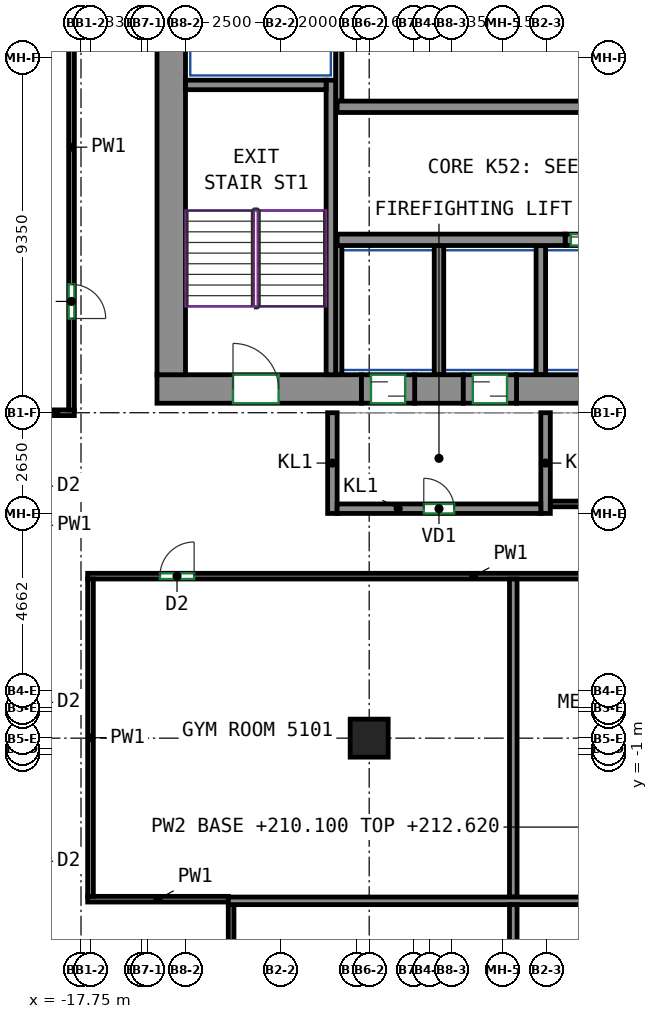
"""IFC4 building model, lengths in metres.
Left out: names, types, materials, properties, quantities, classifications, styles, units other than length and angle.
Written with IfcOpenShell. Run it as: python <this file> out.ifc"""

import sys

from ifc_helpers import new_model, si_unit, direction, frame, frame_2d, origin, origin_2d, place, context, subcontext, project, spatial, rectangle, extrude, source, transform, mapped, element, fill, save


model = new_model("IFC4")
c1 = context("Model", 3, precision=1e-05, world=origin(), true_north=direction((0.0, 1.0)))
c2 = subcontext(c1, "Body", "Model", "MODEL_VIEW")
j1 = project(units=[si_unit("LENGTHUNIT", "METRE"), si_unit("PLANEANGLEUNIT", "RADIAN")], contexts=[c1])
p1 = place(None, origin())
s1 = spatial("IfcSite", under=j1, at=p1, CompositionType="ELEMENT")
p2 = place(p1, origin())
s2 = spatial("IfcBuilding", under=s1, at=p2, CompositionType="ELEMENT")
p3 = place(p2, frame((0.0, 0.0, 210.1)))
s3 = spatial("IfcBuildingStorey", under=s2, at=p3, CompositionType="ELEMENT", Elevation=210.1)
m1 = source(origin(), c2, "Body", "SweptSolid", [
    extrude(rectangle(XDim=1.0, YDim=1.0, at=origin_2d()), origin(), (0.0, 0.0, 1.0), 3.12),
])
p4 = place(p3, frame((-10.167, -0.562, 0.0), z_axis=(0.0, 0.0, 1.0), x_axis=(1.0, 0.0, 0.0)))
e1 = element("IfcColumn", 1, at=p4, inside=s3, PredefinedType="COLUMN", context=c2, shape_type="MappedRepresentation", body=[
    mapped(m1, transform((0.0, 0.0, 0.0))),
])
m2 = source(origin(), c2, "Body", "SweptSolid", [
    extrude(rectangle(XDim=5.38, YDim=0.75, at=frame_2d((2.69, 0.0))), origin(), (0.0, 0.0, 1.0), 3.12),
])
p5 = place(p3, frame((-15.75, 8.625, 0.0), z_axis=(0.0, 0.0, 1.0), x_axis=(1.0, 0.0, 0.0)))
e2 = element("IfcWall", 2, at=p5, inside=s3, PredefinedType="SHEAR", context=c2, shape_type="MappedRepresentation", body=[
    mapped(m2, transform((0.0, 0.0, 0.0))),
])
p6 = place(p5, frame((2.0, 0.0, 0.0)))
e3 = element("IfcOpeningElement", 3, at=p6, cuts=e2, PredefinedType="OPENING", context=c2, shape_type="SweptSolid", body=[
    extrude(rectangle(XDim=1.2, YDim=2.1, at=frame_2d((0.6, 1.05))), frame((0.0, 0.385, 0.0), z_axis=(0.0, -1.0, 0.0), x_axis=(1.0, 0.0, 0.0)), (0.0, 0.0, 1.0), 0.77),
])
m3 = source(origin(), c2, "Body", "SweptSolid", [
    extrude(rectangle(XDim=1.28, YDim=0.75, at=frame_2d((0.64, 0.0))), origin(), (0.0, 0.0, 1.0), 3.12),
])
p7 = place(p3, frame((-8.97, 8.625, 0.0), z_axis=(0.0, 0.0, 1.0), x_axis=(1.0, 0.0, 0.0)))
e4 = element("IfcWall", 4, at=p7, inside=s3, PredefinedType="SHEAR", context=c2, shape_type="MappedRepresentation", body=[
    mapped(m3, transform((0.0, 0.0, 0.0))),
])
m4 = source(origin(), c2, "Body", "SweptSolid", [
    extrude(rectangle(XDim=14.18, YDim=0.75, at=frame_2d((7.09, 0.0))), origin(), (0.0, 0.0, 1.0), 3.12),
])
p8 = place(p3, frame((-6.29, 8.625, 0.0), z_axis=(0.0, 0.0, 1.0), x_axis=(1.0, 0.0, 0.0)))
e5 = element("IfcWall", 5, at=p8, inside=s3, PredefinedType="SHEAR", context=c2, shape_type="MappedRepresentation", body=[
    mapped(m4, transform((0.0, 0.0, 0.0))),
])
m5 = source(origin(), c2, "Body", "SweptSolid", [
    extrude(rectangle(XDim=12.0, YDim=0.75, at=frame_2d((6.0, 0.0))), origin(), (0.0, 0.0, 1.0), 3.12),
])
p9 = place(p3, frame((-15.375, 9.0, 0.0), z_axis=(0.0, 0.0, 1.0), x_axis=(0.0, 1.0, 0.0)))
e6 = element("IfcWall", 6, at=p9, inside=s3, PredefinedType="SHEAR", context=c2, shape_type="MappedRepresentation", body=[
    mapped(m5, transform((0.0, 0.0, 0.0))),
])
m6 = source(origin(), c2, "Body", "SweptSolid", [
    extrude(rectangle(XDim=7.75, YDim=0.25, at=frame_2d((3.875, 0.0))), origin(), (0.0, 0.0, 1.0), 3.12),
])
p10 = place(p3, frame((-11.175, 9.0, 0.0), z_axis=(0.0, 0.0, 1.0), x_axis=(0.0, 1.0, 0.0)))
e7 = element("IfcWall", 7, at=p10, inside=s3, PredefinedType="SHEAR", context=c2, shape_type="MappedRepresentation", body=[
    mapped(m6, transform((0.0, 0.0, 0.0))),
])
m7 = source(origin(), c2, "Body", "SweptSolid", [
    extrude(rectangle(XDim=3.7, YDim=0.25, at=frame_2d((1.85, 0.0))), origin(), (0.0, 0.0, 1.0), 3.12),
])
p11 = place(p3, frame((-15.0, 16.625, 0.0), z_axis=(0.0, 0.0, 1.0), x_axis=(1.0, 0.0, 0.0)))
e8 = element("IfcWall", 8, at=p11, inside=s3, PredefinedType="SHEAR", context=c2, shape_type="MappedRepresentation", body=[
    mapped(m7, transform((0.0, 0.0, 0.0))),
])
m8 = source(origin(), c2, "Body", "SweptSolid", [
    extrude(rectangle(XDim=6.0, YDim=0.3, at=frame_2d((3.0, 0.0))), origin(), (0.0, 0.0, 1.0), 3.12),
])
p12 = place(p3, frame((-11.01, 12.55, 0.0), z_axis=(0.0, 0.0, 1.0), x_axis=(1.0, 0.0, 0.0)))
e9 = element("IfcWall", 9, at=p12, inside=s3, PredefinedType="SHEAR", context=c2, shape_type="MappedRepresentation", body=[
    mapped(m8, transform((0.0, 0.0, 0.0))),
])
m9 = source(origin(), c2, "Body", "SweptSolid", [
    extrude(rectangle(XDim=14.04, YDim=0.3, at=frame_2d((7.02, 0.0))), origin(), (0.0, 0.0, 1.0), 3.12),
])
p13 = place(p3, frame((-11.01, 16.05, 0.0), z_axis=(0.0, 0.0, 1.0), x_axis=(1.0, 0.0, 0.0)))
e10 = element("IfcWall", 10, at=p13, inside=s3, PredefinedType="SHEAR", context=c2, shape_type="MappedRepresentation", body=[
    mapped(m9, transform((0.0, 0.0, 0.0))),
])
m10 = source(origin(), c2, "Body", "SweptSolid", [
    extrude(rectangle(XDim=1.4, YDim=0.3, at=frame_2d((0.7, 0.0))), origin(), (0.0, 0.0, 1.0), 3.12),
])
p14 = place(p3, frame((-5.01, 12.55, 0.0), z_axis=(0.0, 0.0, 1.0), x_axis=(1.0, 0.0, 0.0)))
e11 = element("IfcWall", 11, at=p14, inside=s3, PredefinedType="PARTITIONING", context=c2, shape_type="MappedRepresentation", body=[
    mapped(m10, transform((0.0, 0.0, 0.0))),
])
p15 = place(p14, frame((0.15, 0.0, 0.0)))
e12 = element("IfcOpeningElement", 12, at=p15, cuts=e11, PredefinedType="OPENING", context=c2, shape_type="SweptSolid", body=[
    extrude(rectangle(XDim=1.1, YDim=2.1, at=frame_2d((0.55, 1.05))), frame((0.0, 0.16, 0.0), z_axis=(0.0, -1.0, 0.0), x_axis=(1.0, 0.0, 0.0)), (0.0, 0.0, 1.0), 0.32),
])
m11 = source(origin(), c2, "Body", "SweptSolid", [
    extrude(rectangle(XDim=2.65, YDim=0.25, at=frame_2d((1.325, 0.0))), origin(), (0.0, 0.0, 1.0), 3.12),
])
for number, where, z_axis, x_axis in (
    (13, (-11.135, 5.35, 0.0), (0.0, 0.0, 1.0), (0.0, 1.0, 0.0)),
    (14, (-5.525, 5.35, 0.0), (0.0, 0.0, 1.0), (0.0, 1.0, 0.0)),
):
    element("IfcWall", number, at=place(p3, frame(where, z_axis=z_axis, x_axis=x_axis)), inside=s3, PredefinedType="PARTITIONING", context=c2, shape_type="MappedRepresentation", body=[
        mapped(m11, transform((0.0, 0.0, 0.0))),
    ])
m12 = source(origin(), c2, "Body", "SweptSolid", [
    extrude(rectangle(XDim=5.36, YDim=0.25, at=frame_2d((2.68, 0.0))), origin(), (0.0, 0.0, 1.0), 3.12),
])
p16 = place(p3, frame((-11.01, 5.475, 0.0), z_axis=(0.0, 0.0, 1.0), x_axis=(1.0, 0.0, 0.0)))
e15 = element("IfcWall", 15, at=p16, inside=s3, PredefinedType="PARTITIONING", context=c2, shape_type="MappedRepresentation", body=[
    mapped(m12, transform((0.0, 0.0, 0.0))),
])
p17 = place(p16, frame((2.28, 0.0, 0.0)))
e16 = element("IfcOpeningElement", 16, at=p17, cuts=e15, PredefinedType="OPENING", context=c2, shape_type="SweptSolid", body=[
    extrude(rectangle(XDim=0.8, YDim=2.0, at=frame_2d((0.4, 1.0))), frame((0.0, 0.135, 0.0), z_axis=(0.0, -1.0, 0.0), x_axis=(1.0, 0.0, 0.0)), (0.0, 0.0, 1.0), 0.27),
])
m13 = source(origin(), c2, "Body", "SweptSolid", [
    extrude(rectangle(XDim=4.8, YDim=0.165, at=frame_2d((2.4, 0.0))), origin(), (0.0, 0.0, 1.0), 3.12),
])
p18 = place(p3, frame((-10.968, 16.2, 0.0), z_axis=(0.0, 0.0, 1.0), x_axis=(0.0, 1.0, 0.0)))
e17 = element("IfcWall", 17, at=p18, inside=s3, PredefinedType="PARTITIONING", context=c2, shape_type="MappedRepresentation", body=[
    mapped(m13, transform((0.0, 0.0, 0.0))),
])
m14 = source(origin(), c2, "Body", "SweptSolid", [
    extrude(rectangle(XDim=3.4, YDim=0.165, at=frame_2d((1.7, 0.0))), origin(), (0.0, 0.0, 1.0), 3.12),
])
p19 = place(p3, frame((-10.968, 9.0, 0.0), z_axis=(0.0, 0.0, 1.0), x_axis=(0.0, 1.0, 0.0)))
e18 = element("IfcWall", 18, at=p19, inside=s3, PredefinedType="PARTITIONING", context=c2, shape_type="MappedRepresentation", body=[
    mapped(m14, transform((0.0, 0.0, 0.0))),
])
m15 = source(origin(), c2, "Body", "SweptSolid", [
    extrude(rectangle(XDim=3.4, YDim=0.25, at=frame_2d((1.7, 0.0))), origin(), (0.0, 0.0, 1.0), 3.12),
])
for number, where, z_axis, x_axis in (
    (19, (-5.65, 9.0, 0.0), (0.0, 0.0, 1.0), (0.0, 1.0, 0.0)),
    (20, (-8.33, 9.0, 0.0), (0.0, 0.0, 1.0), (0.0, 1.0, 0.0)),
):
    element("IfcWall", number, at=place(p3, frame(where, z_axis=z_axis, x_axis=x_axis)), inside=s3, PredefinedType="PARTITIONING", context=c2, shape_type="MappedRepresentation", body=[
        mapped(m15, transform((0.0, 0.0, 0.0))),
    ])
m16 = source(origin(), c2, "Body", "SweptSolid", [
    extrude(rectangle(XDim=1.4, YDim=0.75, at=frame_2d((0.7, 0.0))), origin(), (0.0, 0.0, 1.0), 2.7),
])
p20 = place(p3, frame((-10.37, 8.625, 0.0), z_axis=(0.0, 0.0, 1.0), x_axis=(1.0, 0.0, 0.0)))
e21 = element("IfcWall", 21, at=p20, inside=s3, PredefinedType="PARTITIONING", context=c2, shape_type="MappedRepresentation", body=[
    mapped(m16, transform((0.0, 0.0, 0.0))),
])
p21 = place(p20, frame((0.25, 0.0, 0.0)))
e22 = element("IfcOpeningElement", 22, at=p21, cuts=e21, PredefinedType="OPENING", context=c2, shape_type="SweptSolid", body=[
    extrude(rectangle(XDim=0.9, YDim=2.1, at=frame_2d((0.45, 1.05))), frame((0.0, 0.385, 0.0), z_axis=(0.0, -1.0, 0.0), x_axis=(1.0, 0.0, 0.0)), (0.0, 0.0, 1.0), 0.77),
])
m17 = source(origin(), c2, "Body", "SweptSolid", [
    extrude(rectangle(XDim=1.4, YDim=0.75, at=frame_2d((0.7, 0.0))), origin(), (0.0, 0.0, 1.0), 2.7),
])
p22 = place(p3, frame((-7.69, 8.625, 0.0), z_axis=(0.0, 0.0, 1.0), x_axis=(1.0, 0.0, 0.0)))
e23 = element("IfcWall", 23, at=p22, inside=s3, PredefinedType="PARTITIONING", context=c2, shape_type="MappedRepresentation", body=[
    mapped(m17, transform((0.0, 0.0, 0.0))),
])
p23 = place(p22, frame((0.25, 0.0, 0.0)))
e24 = element("IfcOpeningElement", 24, at=p23, cuts=e23, PredefinedType="OPENING", context=c2, shape_type="SweptSolid", body=[
    extrude(rectangle(XDim=0.9, YDim=2.1, at=frame_2d((0.45, 1.05))), frame((0.0, 0.385, 0.0), z_axis=(0.0, -1.0, 0.0), x_axis=(1.0, 0.0, 0.0)), (0.0, 0.0, 1.0), 0.77),
])
p24 = place(p3, frame((-17.925, 8.0, 0.0), z_axis=(0.0, 0.0, 1.0), x_axis=(-1.0, 0.0, 0.0)))
e25 = element("IfcWall", 25, at=p24, inside=s3, PredefinedType="PARTITIONING", context=c2, shape_type="SweptSolid", body=[
    extrude(rectangle(XDim=0.976, YDim=0.15, at=frame_2d((0.488, 0.0))), origin(), (0.0, 0.0, 1.0), 3.12),
])
p25 = place(p3, frame((-18.0, 21.9, 0.0), z_axis=(0.0, 0.0, 1.0), x_axis=(0.0, -1.0, 0.0)))
e26 = element("IfcWall", 26, at=p25, inside=s3, PredefinedType="PARTITIONING", context=c2, shape_type="SweptSolid", body=[
    extrude(rectangle(XDim=13.825, YDim=0.15, at=frame_2d((6.913, 0.0))), origin(), (0.0, 0.0, 1.0), 3.12),
])
p26 = place(p25, frame((10.521, 0.0, 0.0)))
e27 = element("IfcOpeningElement", 27, at=p26, cuts=e26, PredefinedType="OPENING", context=c2, shape_type="SweptSolid", body=[
    extrude(rectangle(XDim=0.9, YDim=2.1, at=frame_2d((0.45, 1.05))), frame((0.0, 0.085, 0.0), z_axis=(0.0, -1.0, 0.0), x_axis=(1.0, 0.0, 0.0)), (0.0, 0.0, 1.0), 0.17),
])
p27 = place(p3, frame((7.875, 5.6, 0.0), z_axis=(0.0, 0.0, 1.0), x_axis=(-1.0, 0.0, 0.0)))
e28 = element("IfcWall", 28, at=p27, inside=s3, PredefinedType="PARTITIONING", context=c2, shape_type="SweptSolid", body=[
    extrude(rectangle(XDim=13.275, YDim=0.15, at=frame_2d((6.637, 0.0))), origin(), (0.0, 0.0, 1.0), 3.12),
])
p28 = place(p27, frame((0.703, 0.0, 0.0)))
e29 = element("IfcOpeningElement", 29, at=p28, cuts=e28, PredefinedType="OPENING", context=c2, shape_type="SweptSolid", body=[
    extrude(rectangle(XDim=1.0, YDim=2.1, at=frame_2d((0.5, 1.05))), frame((0.0, 0.085, 0.0), z_axis=(0.0, -1.0, 0.0), x_axis=(1.0, 0.0, 0.0)), (0.0, 0.0, 1.0), 0.17),
])
p29 = place(p3, frame((-17.575, -4.8, 0.0), z_axis=(0.0, 0.0, 1.0), x_axis=(1.0, 0.0, 0.0)))
e30 = element("IfcWall", 30, at=p29, inside=s3, PredefinedType="PARTITIONING", context=c2, shape_type="SweptSolid", body=[
    extrude(rectangle(XDim=3.702, YDim=0.15, at=frame_2d((1.851, 0.0))), origin(), (0.0, 0.0, 1.0), 3.12),
])
p30 = place(p3, frame((-17.575, 3.7, 0.0), z_axis=(0.0, 0.0, 1.0), x_axis=(1.0, 0.0, 0.0)))
e31 = element("IfcWall", 31, at=p30, inside=s3, PredefinedType="PARTITIONING", context=c2, shape_type="SweptSolid", body=[
    extrude(rectangle(XDim=33.85, YDim=0.15, at=frame_2d((16.925, 0.0))), origin(), (0.0, 0.0, 1.0), 3.12),
])
p31 = place(p30, frame((1.902, 0.0, 0.0)))
e32 = element("IfcOpeningElement", 32, at=p31, cuts=e31, PredefinedType="OPENING", context=c2, shape_type="SweptSolid", body=[
    extrude(rectangle(XDim=0.9, YDim=2.1, at=frame_2d((0.45, 1.05))), frame((0.0, 0.085, 0.0), z_axis=(0.0, -1.0, 0.0), x_axis=(1.0, 0.0, 0.0)), (0.0, 0.0, 1.0), 0.17),
])
p32 = place(p30, frame((15.841, 0.0, 0.0)))
e33 = element("IfcOpeningElement", 33, at=p32, cuts=e31, PredefinedType="OPENING", context=c2, shape_type="SweptSolid", body=[
    extrude(rectangle(XDim=0.9, YDim=2.1, at=frame_2d((0.45, 1.05))), frame((0.0, 0.085, 0.0), z_axis=(0.0, -1.0, 0.0), x_axis=(1.0, 0.0, 0.0)), (0.0, 0.0, 1.0), 0.17),
])
p33 = place(p30, frame((20.724, 0.0, 0.0)))
e34 = element("IfcOpeningElement", 34, at=p33, cuts=e31, PredefinedType="OPENING", context=c2, shape_type="SweptSolid", body=[
    extrude(rectangle(XDim=0.9, YDim=2.1, at=frame_2d((0.45, 1.05))), frame((0.0, 0.085, 0.0), z_axis=(0.0, -1.0, 0.0), x_axis=(1.0, 0.0, 0.0)), (0.0, 0.0, 1.0), 0.17),
])
p34 = place(p30, frame((27.46, 0.0, 0.0)))
e35 = element("IfcOpeningElement", 35, at=p34, cuts=e31, PredefinedType="OPENING", context=c2, shape_type="SweptSolid", body=[
    extrude(rectangle(XDim=0.9, YDim=2.1, at=frame_2d((0.45, 1.05))), frame((0.0, 0.085, 0.0), z_axis=(0.0, -1.0, 0.0), x_axis=(1.0, 0.0, 0.0)), (0.0, 0.0, 1.0), 0.17),
])
p35 = place(p3, frame((-17.5, -4.725, 0.0), z_axis=(0.0, 0.0, 1.0), x_axis=(0.0, 1.0, 0.0)))
e36 = element("IfcWall", 36, at=p35, inside=s3, PredefinedType="PARTITIONING", context=c2, shape_type="SweptSolid", body=[
    extrude(rectangle(XDim=8.35, YDim=0.15, at=frame_2d((4.175, 0.0))), origin(), (0.0, 0.0, 1.0), 3.12),
])
p36 = place(p3, frame((-13.8, -7.75, 0.0), z_axis=(0.0, 0.0, 1.0), x_axis=(0.0, 1.0, 0.0)))
e37 = element("IfcWall", 37, at=p36, inside=s3, PredefinedType="PARTITIONING", context=c2, shape_type="SweptSolid", body=[
    extrude(rectangle(XDim=2.817, YDim=0.15, at=frame_2d((1.408, 0.0))), origin(), (0.0, 0.0, 1.0), 3.12),
])
p37 = place(p3, frame((-6.375, -4.743, 0.0), z_axis=(0.0, 0.0, 1.0), x_axis=(0.0, 1.0, 0.0)))
e38 = element("IfcWall", 38, at=p37, inside=s3, PredefinedType="PARTITIONING", context=c2, shape_type="SweptSolid", body=[
    extrude(rectangle(XDim=8.366, YDim=0.2, at=frame_2d((4.183, 0.0))), origin(), (0.0, 0.0, 1.0), 3.12),
])
p38 = place(p3, frame((-13.873, -4.843, 0.0), z_axis=(0.0, 0.0, 1.0), x_axis=(1.0, 0.0, 0.0)))
e39 = element("IfcWall", 39, at=p38, inside=s3, PredefinedType="PARTITIONING", context=c2, shape_type="SweptSolid", body=[
    extrude(rectangle(XDim=30.146, YDim=0.2, at=frame_2d((15.073, 0.0))), origin(), (0.0, 0.0, 1.0), 3.12),
])
p39 = place(p3, frame((-6.375, -15.423, 0.0), z_axis=(0.0, 0.0, 1.0), x_axis=(0.0, 1.0, 0.0)))
e40 = element("IfcWall", 40, at=p39, inside=s3, PredefinedType="PARTITIONING", context=c2, shape_type="SweptSolid", body=[
    extrude(rectangle(XDim=10.48, YDim=0.2, at=frame_2d((5.24, 0.0))), origin(), (0.0, 0.0, 1.0), 3.12),
])
p40 = place(p17, origin())
e41 = element("IfcDoor", 41, at=p40, inside=s3, OperationType="SINGLE_SWING_LEFT", PredefinedType="DOOR", context=c2, shape_type="SweptSolid", body=[
    extrude(rectangle(XDim=0.8, YDim=2.0, at=frame_2d((0.4, 1.0))), frame((0.0, 0.025, 0.0), z_axis=(0.0, -1.0, 0.0), x_axis=(1.0, 0.0, 0.0)), (0.0, 0.0, 1.0), 0.05),
])
fill(e16, e41)
p41 = place(p21, origin())
e42 = element("IfcDoor", 42, at=p41, inside=s3, OperationType="SLIDING_TO_LEFT", PredefinedType="DOOR", context=c2, shape_type="SweptSolid", body=[
    extrude(rectangle(XDim=0.9, YDim=2.1, at=frame_2d((0.45, 1.05))), frame((0.0, 0.28, 0.0), z_axis=(0.0, -1.0, 0.0), x_axis=(1.0, 0.0, 0.0)), (0.0, 0.0, 1.0), 0.05),
])
fill(e22, e42)
p42 = place(p23, origin())
e43 = element("IfcDoor", 43, at=p42, inside=s3, OperationType="SLIDING_TO_RIGHT", PredefinedType="DOOR", context=c2, shape_type="SweptSolid", body=[
    extrude(rectangle(XDim=0.9, YDim=2.1, at=frame_2d((0.45, 1.05))), frame((0.0, 0.28, 0.0), z_axis=(0.0, -1.0, 0.0), x_axis=(1.0, 0.0, 0.0)), (0.0, 0.0, 1.0), 0.05),
])
fill(e24, e43)
p43 = place(p15, origin())
e44 = element("IfcDoor", 44, at=p43, inside=s3, OperationType="DOUBLE_DOOR_SLIDING", PredefinedType="DOOR", context=c2, shape_type="SweptSolid", body=[
    extrude(rectangle(XDim=1.1, YDim=2.1, at=frame_2d((0.55, 1.05))), frame((0.0, 0.025, 0.0), z_axis=(0.0, -1.0, 0.0), x_axis=(1.0, 0.0, 0.0)), (0.0, 0.0, 1.0), 0.05),
])
fill(e12, e44)
p44 = place(p6, origin())
e45 = element("IfcDoor", 45, at=p44, inside=s3, OperationType="DOUBLE_DOOR_SINGLE_SWING", PredefinedType="DOOR", context=c2, shape_type="SweptSolid", body=[
    extrude(rectangle(XDim=1.2, YDim=2.1, at=frame_2d((0.6, 1.05))), frame((0.0, 0.28, 0.0), z_axis=(0.0, -1.0, 0.0), x_axis=(1.0, 0.0, 0.0)), (0.0, 0.0, 1.0), 0.05),
])
fill(e3, e45)
p45 = place(p31, origin())
e46 = element("IfcDoor", 46, at=p45, inside=s3, OperationType="SINGLE_SWING_RIGHT", PredefinedType="DOOR", context=c2, shape_type="SweptSolid", body=[
    extrude(rectangle(XDim=0.9, YDim=2.1, at=frame_2d((0.45, 1.05))), frame((0.0, 0.025, 0.0), z_axis=(0.0, -1.0, 0.0), x_axis=(1.0, 0.0, 0.0)), (0.0, 0.0, 1.0), 0.05),
])
fill(e32, e46)
p46 = place(p26, origin())
e47 = element("IfcDoor", 47, at=p46, inside=s3, OperationType="SINGLE_SWING_RIGHT", PredefinedType="DOOR", context=c2, shape_type="SweptSolid", body=[
    extrude(rectangle(XDim=0.9, YDim=2.1, at=frame_2d((0.45, 1.05))), frame((0.0, 0.025, 0.0), z_axis=(0.0, -1.0, 0.0), x_axis=(1.0, 0.0, 0.0)), (0.0, 0.0, 1.0), 0.05),
])
fill(e27, e47)
save(model, sys.argv[1])
